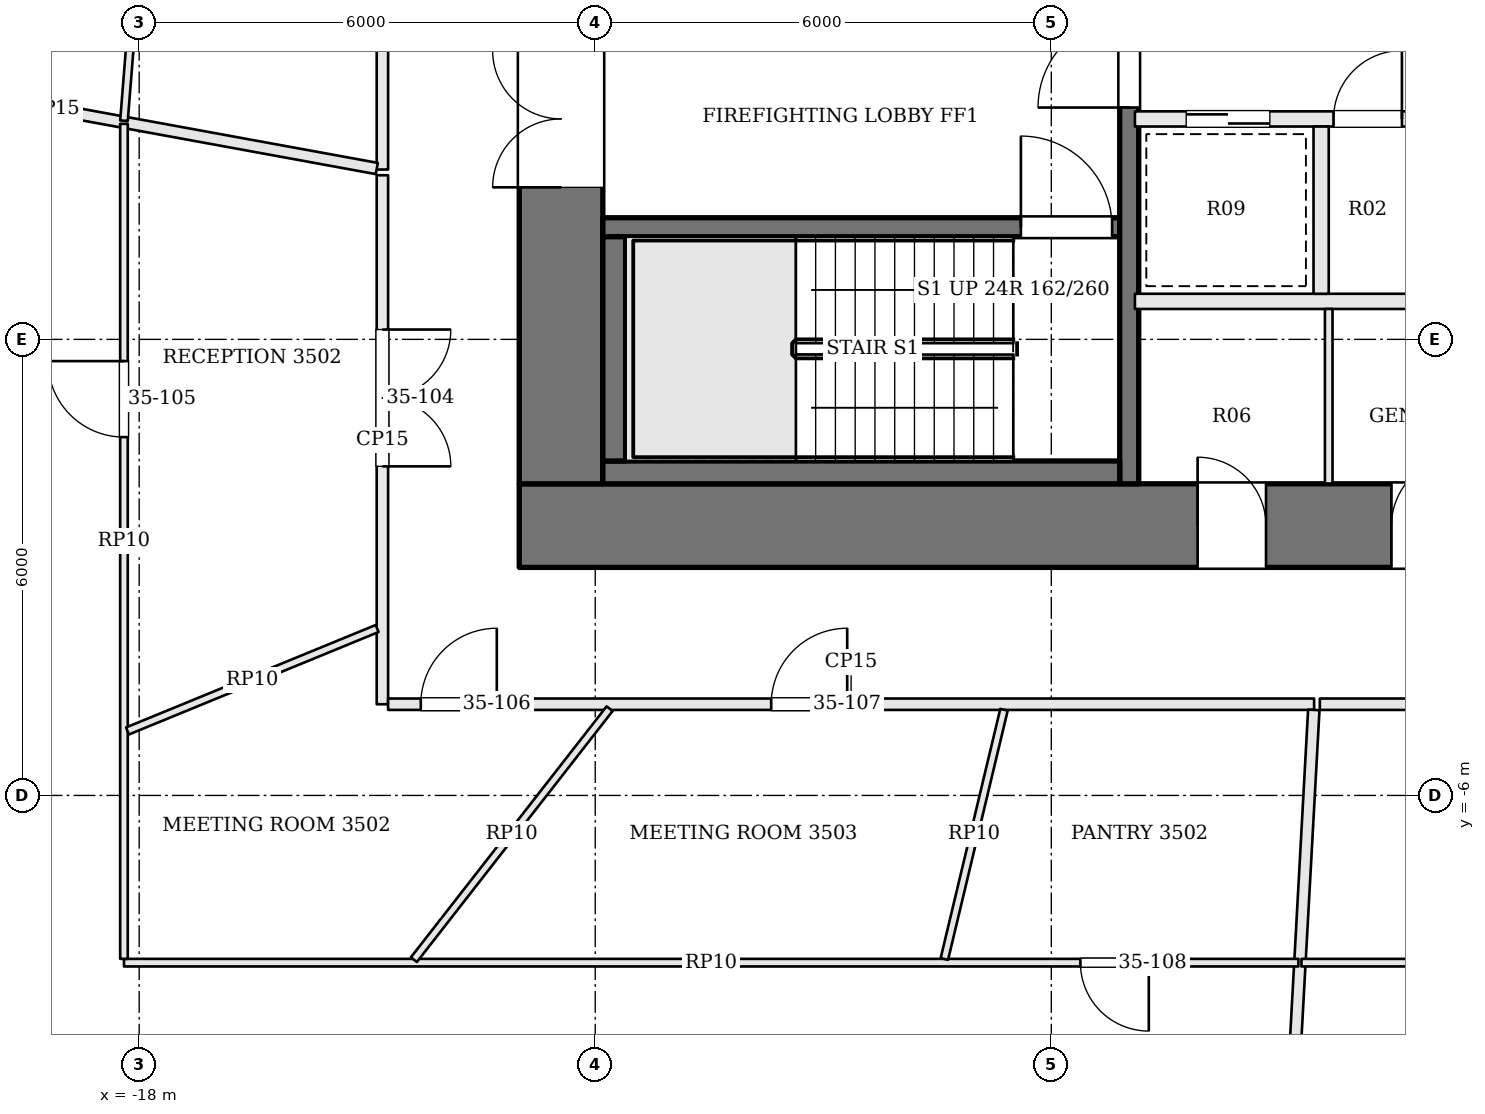
"""IFC4 building model, lengths in metres.
Left out: names, types, materials, properties, quantities, classifications, styles, units other than length and angle.
Written with IfcOpenShell. Run it as: python <this file> out.ifc"""

import sys

from ifc_helpers import new_model, si_unit, direction, frame, frame_2d, origin, place, context, subcontext, project, spatial, rectangle, extrude, element, fill, save


model = new_model("IFC4")
c1 = context("Model", 3, precision=1e-05, world=origin(), true_north=direction((0.0, 1.0)))
c2 = subcontext(c1, "Body", "Model", "MODEL_VIEW")
j1 = project(units=[si_unit("LENGTHUNIT", "METRE"), si_unit("PLANEANGLEUNIT", "RADIAN")], contexts=[c1])
p1 = place(None, origin())
s1 = spatial("IfcSite", under=j1, at=p1, CompositionType="ELEMENT")
p2 = place(p1, origin())
s2 = spatial("IfcBuilding", under=s1, at=p2, CompositionType="ELEMENT")
p3 = place(p2, frame((0.0, 0.0, 146.1)))
s3 = spatial("IfcBuildingStorey", under=s2, at=p3, CompositionType="ELEMENT", Elevation=146.1)
p4 = place(p3, frame((-13.0, -2.45, 0.0), z_axis=(0.0, 0.0, 1.0), x_axis=(1.0, 0.0, 0.0)))
e1 = element("IfcWall", 1, at=p4, inside=s3, PredefinedType="SHEAR", context=c2, shape_type="SweptSolid", body=[
    extrude(rectangle(XDim=26.0, YDim=1.1, at=frame_2d((13.0, 0.0))), origin(), (0.0, 0.0, 1.0), 3.9),
])
p5 = place(p4, frame((8.925, 0.0, 0.0)))
e2 = element("IfcOpeningElement", 2, at=p5, cuts=e1, PredefinedType="OPENING", context=c2, shape_type="SweptSolid", body=[
    extrude(rectangle(XDim=0.9, YDim=2.1, at=frame_2d((0.45, 1.05))), frame((0.0, 0.56, 0.0), z_axis=(0.0, -1.0, 0.0), x_axis=(1.0, 0.0, 0.0)), (0.0, 0.0, 1.0), 1.12),
])
p6 = place(p4, frame((11.475, 0.0, 0.0)))
e3 = element("IfcOpeningElement", 3, at=p6, cuts=e1, PredefinedType="OPENING", context=c2, shape_type="SweptSolid", body=[
    extrude(rectangle(XDim=0.9, YDim=2.1, at=frame_2d((0.45, 1.05))), frame((0.0, 0.56, 0.0), z_axis=(0.0, -1.0, 0.0), x_axis=(1.0, 0.0, 0.0)), (0.0, 0.0, 1.0), 1.12),
])
p7 = place(p4, frame((13.6, 0.0, 0.0)))
e4 = element("IfcOpeningElement", 4, at=p7, cuts=e1, PredefinedType="OPENING", context=c2, shape_type="SweptSolid", body=[
    extrude(rectangle(XDim=1.0, YDim=2.1, at=frame_2d((0.5, 1.05))), frame((0.0, 0.56, 0.0), z_axis=(0.0, -1.0, 0.0), x_axis=(1.0, 0.0, 0.0)), (0.0, 0.0, 1.0), 1.12),
])
p8 = place(p4, frame((15.95, 0.0, 0.0)))
e5 = element("IfcOpeningElement", 5, at=p8, cuts=e1, PredefinedType="OPENING", context=c2, shape_type="SweptSolid", body=[
    extrude(rectangle(XDim=1.0, YDim=2.1, at=frame_2d((0.5, 1.05))), frame((0.0, 0.56, 0.0), z_axis=(0.0, -1.0, 0.0), x_axis=(1.0, 0.0, 0.0)), (0.0, 0.0, 1.0), 1.12),
])
p9 = place(p3, frame((-12.45, -1.9, 0.0), z_axis=(0.0, 0.0, 1.0), x_axis=(0.0, 1.0, 0.0)))
e6 = element("IfcWall", 6, at=p9, inside=s3, PredefinedType="SHEAR", context=c2, shape_type="SweptSolid", body=[
    extrude(rectangle(XDim=12.8, YDim=1.1, at=frame_2d((6.4, 0.0))), origin(), (0.0, 0.0, 1.0), 3.9),
])
p10 = place(p9, frame((3.9, 0.0, 0.0)))
e7 = element("IfcOpeningElement", 7, at=p10, cuts=e6, PredefinedType="OPENING", context=c2, shape_type="SweptSolid", body=[
    extrude(rectangle(XDim=1.8, YDim=2.1, at=frame_2d((0.9, 1.05))), frame((0.0, 0.56, 0.0), z_axis=(0.0, -1.0, 0.0), x_axis=(1.0, 0.0, 0.0)), (0.0, 0.0, 1.0), 1.12),
])
p11 = place(p3, frame((-11.9, 1.475, 0.0), z_axis=(0.0, 0.0, 1.0), x_axis=(1.0, 0.0, 0.0)))
e8 = element("IfcWall", 8, at=p11, inside=s3, PredefinedType="SOLIDWALL", context=c2, shape_type="SweptSolid", body=[
    extrude(rectangle(XDim=6.8, YDim=0.25, at=frame_2d((3.4, 0.0))), origin(), (0.0, 0.0, 1.0), 3.7),
])
p12 = place(p11, frame((5.5, 0.0, 0.0)))
e9 = element("IfcOpeningElement", 9, at=p12, cuts=e8, PredefinedType="OPENING", context=c2, shape_type="SweptSolid", body=[
    extrude(rectangle(XDim=1.2, YDim=2.1, at=frame_2d((0.6, 1.05))), frame((0.0, 0.135, 0.0), z_axis=(0.0, -1.0, 0.0), x_axis=(1.0, 0.0, 0.0)), (0.0, 0.0, 1.0), 0.27),
])
p13 = place(p3, frame((-4.975, -1.9, 0.0), z_axis=(0.0, 0.0, 1.0), x_axis=(0.0, 1.0, 0.0)))
e10 = element("IfcWall", 10, at=p13, inside=s3, PredefinedType="SOLIDWALL", context=c2, shape_type="SweptSolid", body=[
    extrude(rectangle(XDim=12.8, YDim=0.25, at=frame_2d((6.4, 0.0))), origin(), (0.0, 0.0, 1.0), 3.7),
])
p14 = place(p13, frame((4.95, 0.0, 0.0)))
e11 = element("IfcOpeningElement", 11, at=p14, cuts=e10, PredefinedType="OPENING", context=c2, shape_type="SweptSolid", body=[
    extrude(rectangle(XDim=1.2, YDim=2.1, at=frame_2d((0.6, 1.05))), frame((0.0, 0.135, 0.0), z_axis=(0.0, -1.0, 0.0), x_axis=(1.0, 0.0, 0.0)), (0.0, 0.0, 1.0), 0.27),
])
p15 = place(p3, frame((-11.9, -1.75, 0.0), z_axis=(0.0, 0.0, 1.0), x_axis=(1.0, 0.0, 0.0)))
e12 = element("IfcWall", 12, at=p15, inside=s3, PredefinedType="SOLIDWALL", context=c2, shape_type="SweptSolid", body=[
    extrude(rectangle(XDim=6.8, YDim=0.3, at=frame_2d((3.4, 0.0))), origin(), (0.0, 0.0, 1.0), 3.7),
])
p16 = place(p3, frame((-11.75, -1.6, 0.0), z_axis=(0.0, 0.0, 1.0), x_axis=(0.0, 1.0, 0.0)))
e13 = element("IfcWall", 13, at=p16, inside=s3, PredefinedType="SOLIDWALL", context=c2, shape_type="SweptSolid", body=[
    extrude(rectangle(XDim=2.95, YDim=0.3, at=frame_2d((1.475, 0.0))), origin(), (0.0, 0.0, 1.0), 3.7),
])
p17 = place(p3, frame((-4.9, 0.5, 0.0), z_axis=(0.0, 0.0, 1.0), x_axis=(1.0, 0.0, 0.0)))
e14 = element("IfcWall", 14, at=p17, inside=s3, PredefinedType="SOLIDWALL", context=c2, shape_type="SweptSolid", body=[
    extrude(rectangle(XDim=9.8, YDim=0.2, at=frame_2d((4.9, 0.0))), origin(), (0.0, 0.0, 1.0), 3.7),
])
p18 = place(p3, frame((-4.9, 2.9, 0.0), z_axis=(0.0, 0.0, 1.0), x_axis=(1.0, 0.0, 0.0)))
e15 = element("IfcWall", 15, at=p18, inside=s3, PredefinedType="SOLIDWALL", context=c2, shape_type="SweptSolid", body=[
    extrude(rectangle(XDim=9.8, YDim=0.2, at=frame_2d((4.9, 0.0))), origin(), (0.0, 0.0, 1.0), 3.7),
])
p19 = place(p18, frame((0.675, 0.0, 0.0)))
e16 = element("IfcOpeningElement", 16, at=p19, cuts=e15, PredefinedType="OPENING", context=c2, shape_type="SweptSolid", body=[
    extrude(rectangle(XDim=1.1, YDim=2.1, at=frame_2d((0.55, 1.05))), frame((0.0, 0.11, 0.0), z_axis=(0.0, -1.0, 0.0), x_axis=(1.0, 0.0, 0.0)), (0.0, 0.0, 1.0), 0.22),
])
p20 = place(p18, frame((2.613, 0.0, 0.0)))
e17 = element("IfcOpeningElement", 17, at=p20, cuts=e15, PredefinedType="OPENING", context=c2, shape_type="SweptSolid", body=[
    extrude(rectangle(XDim=0.9, YDim=2.1, at=frame_2d((0.45, 1.05))), frame((0.0, 0.11, 0.0), z_axis=(0.0, -1.0, 0.0), x_axis=(1.0, 0.0, 0.0)), (0.0, 0.0, 1.0), 0.22),
])
p21 = place(p18, frame((4.35, 0.0, 0.0)))
e18 = element("IfcOpeningElement", 18, at=p21, cuts=e15, PredefinedType="OPENING", context=c2, shape_type="SweptSolid", body=[
    extrude(rectangle(XDim=1.1, YDim=2.1, at=frame_2d((0.55, 1.05))), frame((0.0, 0.11, 0.0), z_axis=(0.0, -1.0, 0.0), x_axis=(1.0, 0.0, 0.0)), (0.0, 0.0, 1.0), 0.22),
])
p22 = place(p18, frame((7.463, 0.0, 0.0)))
e19 = element("IfcOpeningElement", 19, at=p22, cuts=e15, PredefinedType="OPENING", context=c2, shape_type="SweptSolid", body=[
    extrude(rectangle(XDim=1.0, YDim=2.1, at=frame_2d((0.5, 1.05))), frame((0.0, 0.11, 0.0), z_axis=(0.0, -1.0, 0.0), x_axis=(1.0, 0.0, 0.0)), (0.0, 0.0, 1.0), 0.22),
])
p23 = place(p3, frame((-2.45, 0.6, 0.0), z_axis=(0.0, 0.0, 1.0), x_axis=(0.0, 1.0, 0.0)))
e20 = element("IfcWall", 20, at=p23, inside=s3, PredefinedType="SOLIDWALL", context=c2, shape_type="SweptSolid", body=[
    extrude(rectangle(XDim=2.2, YDim=0.2, at=frame_2d((1.1, 0.0))), origin(), (0.0, 0.0, 1.0), 3.7),
])
p24 = place(p3, frame((-2.35, -1.9, 0.0), z_axis=(0.0, 0.0, 1.0), x_axis=(0.0, 1.0, 0.0)))
e21 = element("IfcWall", 21, at=p24, inside=s3, PredefinedType="PARTITIONING", context=c2, shape_type="SweptSolid", body=[
    extrude(rectangle(XDim=2.3, YDim=0.1, at=frame_2d((1.15, 0.0))), origin(), (0.0, 0.0, 1.0), 3.7),
])
p25 = place(p3, frame((-14.8, 13.725, 0.0), z_axis=(0.0, 0.0, 1.0), x_axis=(0.0, -1.0, 0.0)))
e22 = element("IfcWall", 22, at=p25, inside=s3, PredefinedType="PARTITIONING", context=c2, shape_type="SweptSolid", body=[
    extrude(rectangle(XDim=11.491, YDim=0.15, at=frame_2d((5.745, 0.0))), origin(), (0.0, 0.0, 1.0), 3.198),
])
p26 = place(p25, frame((2.45, 0.0, 0.0)))
e23 = element("IfcOpeningElement", 23, at=p26, cuts=e22, PredefinedType="OPENING", context=c2, shape_type="SweptSolid", body=[
    extrude(rectangle(XDim=1.0, YDim=2.1, at=frame_2d((0.5, 1.05))), frame((0.0, 0.085, 0.0), z_axis=(0.0, -1.0, 0.0), x_axis=(1.0, 0.0, 0.0)), (0.0, 0.0, 1.0), 0.17),
])
p27 = place(p25, frame((7.95, 0.0, 0.0)))
e24 = element("IfcOpeningElement", 24, at=p27, cuts=e22, PredefinedType="OPENING", context=c2, shape_type="SweptSolid", body=[
    extrude(rectangle(XDim=1.0, YDim=2.1, at=frame_2d((0.5, 1.05))), frame((0.0, 0.085, 0.0), z_axis=(0.0, -1.0, 0.0), x_axis=(1.0, 0.0, 0.0)), (0.0, 0.0, 1.0), 0.17),
])
p28 = place(p3, frame((-23.373, 3.802, 0.0), z_axis=(0.0, 0.0, 1.0), x_axis=(0.983692652106, -0.179857627561, 0.0)))
e25 = element("IfcWall", 25, at=p28, inside=s3, PredefinedType="PARTITIONING", context=c2, shape_type="SweptSolid", body=[
    extrude(rectangle(XDim=8.64, YDim=0.15, at=frame_2d((4.32, 0.0))), origin(), (0.0, 0.0, 1.0), 3.234),
])
p29 = place(p3, frame((-14.8, 2.159, 0.0), z_axis=(0.0, 0.0, 1.0), x_axis=(0.0, -1.0, 0.0)))
e26 = element("IfcWall", 26, at=p29, inside=s3, PredefinedType="PARTITIONING", context=c2, shape_type="SweptSolid", body=[
    extrude(rectangle(XDim=6.959, YDim=0.15, at=frame_2d((3.479, 0.0))), origin(), (0.0, 0.0, 1.0), 3.198),
])
p30 = place(p29, frame((2.03, 0.0, 0.0)))
e27 = element("IfcOpeningElement", 27, at=p30, cuts=e26, PredefinedType="OPENING", context=c2, shape_type="SweptSolid", body=[
    extrude(rectangle(XDim=1.8, YDim=2.1, at=frame_2d((0.9, 1.05))), frame((0.0, 0.085, 0.0), z_axis=(0.0, -1.0, 0.0), x_axis=(1.0, 0.0, 0.0)), (0.0, 0.0, 1.0), 0.17),
])
p31 = place(p3, frame((-14.725, -4.8, 0.0), z_axis=(0.0, 0.0, 1.0), x_axis=(1.0, 0.0, 0.0)))
e28 = element("IfcWall", 28, at=p31, inside=s3, PredefinedType="PARTITIONING", context=c2, shape_type="SweptSolid", body=[
    extrude(rectangle(XDim=12.183, YDim=0.15, at=frame_2d((6.091, 0.0))), origin(), (0.0, 0.0, 1.0), 3.198),
])
p32 = place(p31, frame((0.43, 0.0, 0.0)))
e29 = element("IfcOpeningElement", 29, at=p32, cuts=e28, PredefinedType="OPENING", context=c2, shape_type="SweptSolid", body=[
    extrude(rectangle(XDim=1.0, YDim=2.4, at=frame_2d((0.5, 1.2))), frame((0.0, 0.085, 0.0), z_axis=(0.0, -1.0, 0.0), x_axis=(1.0, 0.0, 0.0)), (0.0, 0.0, 1.0), 0.17),
])
p33 = place(p31, frame((5.04, 0.0, 0.0)))
e30 = element("IfcOpeningElement", 30, at=p33, cuts=e28, PredefinedType="OPENING", context=c2, shape_type="SweptSolid", body=[
    extrude(rectangle(XDim=1.0, YDim=2.4, at=frame_2d((0.5, 1.2))), frame((0.0, 0.085, 0.0), z_axis=(0.0, -1.0, 0.0), x_axis=(1.0, 0.0, 0.0)), (0.0, 0.0, 1.0), 0.17),
])
p34 = place(p3, frame((-3.347, -19.434, 0.0), z_axis=(0.0, 0.0, 1.0), x_axis=(0.054887619748, 0.998492538379, 0.0)))
e31 = element("IfcWall", 31, at=p34, inside=s3, PredefinedType="PARTITIONING", context=c2, shape_type="SweptSolid", body=[
    extrude(rectangle(XDim=14.581, YDim=0.15, at=frame_2d((7.29, 0.0))), origin(), (0.0, 0.0, 1.0), 3.234),
])
p35 = place(p3, frame((-2.467, -4.8, 0.0), z_axis=(0.0, 0.0, 1.0), x_axis=(1.0, 0.0, 0.0)))
e32 = element("IfcWall", 32, at=p35, inside=s3, PredefinedType="PARTITIONING", context=c2, shape_type="SweptSolid", body=[
    extrude(rectangle(XDim=17.267, YDim=0.15, at=frame_2d((8.634, 0.0))), origin(), (0.0, 0.0, 1.0), 3.198),
])
p36 = place(p35, frame((3.64, 0.0, 0.0)))
e33 = element("IfcOpeningElement", 33, at=p36, cuts=e32, PredefinedType="OPENING", context=c2, shape_type="SweptSolid", body=[
    extrude(rectangle(XDim=1.8, YDim=2.1, at=frame_2d((0.9, 1.05))), frame((0.0, 0.085, 0.0), z_axis=(0.0, -1.0, 0.0), x_axis=(1.0, 0.0, 0.0)), (0.0, 0.0, 1.0), 0.17),
])
p37 = place(p35, frame((11.152, 0.0, 0.0)))
e34 = element("IfcOpeningElement", 34, at=p37, cuts=e32, PredefinedType="OPENING", context=c2, shape_type="SweptSolid", body=[
    extrude(rectangle(XDim=1.0, YDim=2.4, at=frame_2d((0.5, 1.2))), frame((0.0, 0.085, 0.0), z_axis=(0.0, -1.0, 0.0), x_axis=(1.0, 0.0, 0.0)), (0.0, 0.0, 1.0), 0.17),
])
p38 = place(p3, frame((-18.2, 2.876, 0.0), z_axis=(0.0, 0.0, 1.0), x_axis=(0.079629418232, 0.99682453609, 0.0)))
e35 = element("IfcWall", 35, at=p38, inside=s3, PredefinedType="PARTITIONING", context=c2, shape_type="SweptSolid", body=[
    extrude(rectangle(XDim=8.631, YDim=0.1, at=frame_2d((4.315, 0.0))), origin(), (0.0, 0.0, 1.0), 3.184),
])
p39 = place(p38, frame((2.815, 0.0, 0.0)))
e36 = element("IfcOpeningElement", 36, at=p39, cuts=e35, PredefinedType="OPENING", context=c2, shape_type="SweptSolid", body=[
    extrude(rectangle(XDim=0.9, YDim=2.1, at=frame_2d((0.45, 1.05))), frame((0.0, 0.06, 0.0), z_axis=(0.0, -1.0, 0.0), x_axis=(1.0, 0.0, 0.0)), (0.0, 0.0, 1.0), 0.12),
])
p40 = place(p3, frame((-2.749, -8.2, 0.0), z_axis=(0.0, 0.0, 1.0), x_axis=(-1.0, 0.0, 0.0)))
e37 = element("IfcWall", 37, at=p40, inside=s3, PredefinedType="PARTITIONING", context=c2, shape_type="SweptSolid", body=[
    extrude(rectangle(XDim=15.451, YDim=0.1, at=frame_2d((7.725, 0.0))), origin(), (0.0, 0.0, 1.0), 3.184),
])
p41 = place(p40, frame((1.968, 0.0, 0.0)))
e38 = element("IfcOpeningElement", 38, at=p41, cuts=e37, PredefinedType="OPENING", context=c2, shape_type="SweptSolid", body=[
    extrude(rectangle(XDim=0.9, YDim=2.1, at=frame_2d((0.45, 1.05))), frame((0.0, 0.06, 0.0), z_axis=(0.0, -1.0, 0.0), x_axis=(1.0, 0.0, 0.0)), (0.0, 0.0, 1.0), 0.12),
])
p42 = place(p3, frame((-18.2, -8.15, 0.0), z_axis=(0.0, 0.0, 1.0), x_axis=(0.0, 1.0, 0.0)))
e39 = element("IfcWall", 39, at=p42, inside=s3, PredefinedType="PARTITIONING", context=c2, shape_type="SweptSolid", body=[
    extrude(rectangle(XDim=10.986, YDim=0.1, at=frame_2d((5.493, 0.0))), origin(), (0.0, 0.0, 1.0), 3.184),
])
p43 = place(p42, frame((6.864, 0.0, 0.0)))
e40 = element("IfcOpeningElement", 40, at=p43, cuts=e39, PredefinedType="OPENING", context=c2, shape_type="SweptSolid", body=[
    extrude(rectangle(XDim=1.0, YDim=2.1, at=frame_2d((0.5, 1.05))), frame((0.0, 0.06, 0.0), z_axis=(0.0, -1.0, 0.0), x_axis=(1.0, 0.0, 0.0)), (0.0, 0.0, 1.0), 0.12),
])
p44 = place(p3, frame((-14.869, -3.804, 0.0), z_axis=(0.0, 0.0, 1.0), x_axis=(-0.925124650719, -0.379663509746, 0.0)))
e41 = element("IfcWall", 41, at=p44, inside=s3, PredefinedType="PARTITIONING", context=c2, shape_type="SweptSolid", body=[
    extrude(rectangle(XDim=3.55, YDim=0.1, at=frame_2d((1.775, 0.0))), origin(), (0.0, 0.0, 1.0), 3.184),
])
p45 = place(p3, frame((-11.811, -4.859, 0.0), z_axis=(0.0, 0.0, 1.0), x_axis=(-0.614997719786, -0.788528886382, 0.0)))
e42 = element("IfcWall", 42, at=p45, inside=s3, PredefinedType="PARTITIONING", context=c2, shape_type="SweptSolid", body=[
    extrude(rectangle(XDim=4.187, YDim=0.1, at=frame_2d((2.094, 0.0))), origin(), (0.0, 0.0, 1.0), 3.184),
])
p46 = place(p3, frame((-6.622, -4.873, 0.0), z_axis=(0.0, 0.0, 1.0), x_axis=(-0.232759359005, -0.972534359699, 0.0)))
e43 = element("IfcWall", 43, at=p46, inside=s3, PredefinedType="PARTITIONING", context=c2, shape_type="SweptSolid", body=[
    extrude(rectangle(XDim=3.371, YDim=0.1, at=frame_2d((1.686, 0.0))), origin(), (0.0, 0.0, 1.0), 3.184),
])
p47 = place(p3, frame((18.15, -8.2, 0.0), z_axis=(0.0, 0.0, 1.0), x_axis=(-1.0, 0.0, 0.0)))
e44 = element("IfcWall", 44, at=p47, inside=s3, PredefinedType="PARTITIONING", context=c2, shape_type="SweptSolid", body=[
    extrude(rectangle(XDim=20.859, YDim=0.1, at=frame_2d((10.43, 0.0))), origin(), (0.0, 0.0, 1.0), 3.184),
])
p48 = place(p47, frame((14.793, 0.0, 0.0)))
e45 = element("IfcOpeningElement", 45, at=p48, cuts=e44, PredefinedType="OPENING", context=c2, shape_type="SweptSolid", body=[
    extrude(rectangle(XDim=1.0, YDim=2.1, at=frame_2d((0.5, 1.05))), frame((0.0, 0.06, 0.0), z_axis=(0.0, -1.0, 0.0), x_axis=(1.0, 0.0, 0.0)), (0.0, 0.0, 1.0), 0.12),
])
p49 = place(p10, origin())
e46 = element("IfcDoor", 46, at=p49, inside=s3, OperationType="DOUBLE_DOOR_SINGLE_SWING", PredefinedType="DOOR", context=c2, shape_type="SweptSolid", body=[
    extrude(rectangle(XDim=1.8, YDim=2.1, at=frame_2d((0.9, 1.05))), frame((0.0, 0.025, 0.0), z_axis=(0.0, -1.0, 0.0), x_axis=(1.0, 0.0, 0.0)), (0.0, 0.0, 1.0), 0.05),
])
fill(e7, e46)
p50 = place(p14, origin())
e47 = element("IfcDoor", 47, at=p50, inside=s3, OperationType="SINGLE_SWING_LEFT", PredefinedType="DOOR", context=c2, shape_type="SweptSolid", body=[
    extrude(rectangle(XDim=1.2, YDim=2.1, at=frame_2d((0.6, 1.05))), frame((0.0, 0.025, 0.0), z_axis=(0.0, -1.0, 0.0), x_axis=(1.0, 0.0, 0.0)), (0.0, 0.0, 1.0), 0.05),
])
fill(e11, e47)
p51 = place(p12, origin())
e48 = element("IfcDoor", 48, at=p51, inside=s3, OperationType="SINGLE_SWING_LEFT", PredefinedType="DOOR", context=c2, shape_type="SweptSolid", body=[
    extrude(rectangle(XDim=1.2, YDim=2.1, at=frame_2d((0.6, 1.05))), frame((0.0, 0.025, 0.0), z_axis=(0.0, -1.0, 0.0), x_axis=(1.0, 0.0, 0.0)), (0.0, 0.0, 1.0), 0.05),
])
fill(e9, e48)
p52 = place(p19, origin())
e49 = element("IfcDoor", 49, at=p52, inside=s3, OperationType="SLIDING_TO_RIGHT", PredefinedType="DOOR", context=c2, shape_type="SweptSolid", body=[
    extrude(rectangle(XDim=1.1, YDim=2.1, at=frame_2d((0.55, 1.05))), frame((0.0, 0.025, 0.0), z_axis=(0.0, -1.0, 0.0), x_axis=(1.0, 0.0, 0.0)), (0.0, 0.0, 1.0), 0.05),
])
fill(e16, e49)
p53 = place(p20, origin())
e50 = element("IfcDoor", 50, at=p53, inside=s3, OperationType="SINGLE_SWING_RIGHT", PredefinedType="DOOR", context=c2, shape_type="SweptSolid", body=[
    extrude(rectangle(XDim=0.9, YDim=2.1, at=frame_2d((0.45, 1.05))), frame((0.0, 0.025, 0.0), z_axis=(0.0, -1.0, 0.0), x_axis=(1.0, 0.0, 0.0)), (0.0, 0.0, 1.0), 0.05),
])
fill(e17, e50)
p54 = place(p5, origin())
e51 = element("IfcDoor", 51, at=p54, inside=s3, OperationType="SINGLE_SWING_LEFT", PredefinedType="DOOR", context=c2, shape_type="SweptSolid", body=[
    extrude(rectangle(XDim=0.9, YDim=2.1, at=frame_2d((0.45, 1.05))), frame((0.0, 0.025, 0.0), z_axis=(0.0, -1.0, 0.0), x_axis=(1.0, 0.0, 0.0)), (0.0, 0.0, 1.0), 0.05),
])
fill(e2, e51)
p55 = place(p6, origin())
e52 = element("IfcDoor", 52, at=p55, inside=s3, OperationType="SINGLE_SWING_RIGHT", PredefinedType="DOOR", context=c2, shape_type="SweptSolid", body=[
    extrude(rectangle(XDim=0.9, YDim=2.1, at=frame_2d((0.45, 1.05))), frame((0.0, 0.025, 0.0), z_axis=(0.0, -1.0, 0.0), x_axis=(1.0, 0.0, 0.0)), (0.0, 0.0, 1.0), 0.05),
])
fill(e3, e52)
p56 = place(p30, origin())
e53 = element("IfcDoor", 53, at=p56, inside=s3, OperationType="DOUBLE_DOOR_SINGLE_SWING", PredefinedType="DOOR", context=c2, shape_type="SweptSolid", body=[
    extrude(rectangle(XDim=1.8, YDim=2.1, at=frame_2d((0.9, 1.05))), frame((0.0, 0.025, 0.0), z_axis=(0.0, -1.0, 0.0), x_axis=(1.0, 0.0, 0.0)), (0.0, 0.0, 1.0), 0.05),
])
fill(e27, e53)
p57 = place(p43, origin())
e54 = element("IfcDoor", 54, at=p57, inside=s3, OperationType="SINGLE_SWING_RIGHT", PredefinedType="DOOR", context=c2, shape_type="SweptSolid", body=[
    extrude(rectangle(XDim=1.0, YDim=2.1, at=frame_2d((0.5, 1.05))), frame((0.0, 0.025, 0.0), z_axis=(0.0, -1.0, 0.0), x_axis=(1.0, 0.0, 0.0)), (0.0, 0.0, 1.0), 0.05),
])
fill(e40, e54)
p58 = place(p32, origin())
e55 = element("IfcDoor", 55, at=p58, inside=s3, OperationType="SINGLE_SWING_RIGHT", PredefinedType="DOOR", context=c2, shape_type="SweptSolid", body=[
    extrude(rectangle(XDim=1.0, YDim=2.4, at=frame_2d((0.5, 1.2))), frame((0.0, 0.025, 0.0), z_axis=(0.0, -1.0, 0.0), x_axis=(1.0, 0.0, 0.0)), (0.0, 0.0, 1.0), 0.05),
])
fill(e29, e55)
p59 = place(p33, origin())
e56 = element("IfcDoor", 56, at=p59, inside=s3, OperationType="SINGLE_SWING_RIGHT", PredefinedType="DOOR", context=c2, shape_type="SweptSolid", body=[
    extrude(rectangle(XDim=1.0, YDim=2.4, at=frame_2d((0.5, 1.2))), frame((0.0, 0.025, 0.0), z_axis=(0.0, -1.0, 0.0), x_axis=(1.0, 0.0, 0.0)), (0.0, 0.0, 1.0), 0.05),
])
fill(e30, e56)
p60 = place(p41, origin())
e57 = element("IfcDoor", 57, at=p60, inside=s3, OperationType="SINGLE_SWING_LEFT", PredefinedType="DOOR", context=c2, shape_type="SweptSolid", body=[
    extrude(rectangle(XDim=0.9, YDim=2.1, at=frame_2d((0.45, 1.05))), frame((0.0, 0.025, 0.0), z_axis=(0.0, -1.0, 0.0), x_axis=(1.0, 0.0, 0.0)), (0.0, 0.0, 1.0), 0.05),
])
fill(e38, e57)
save(model, sys.argv[1])
